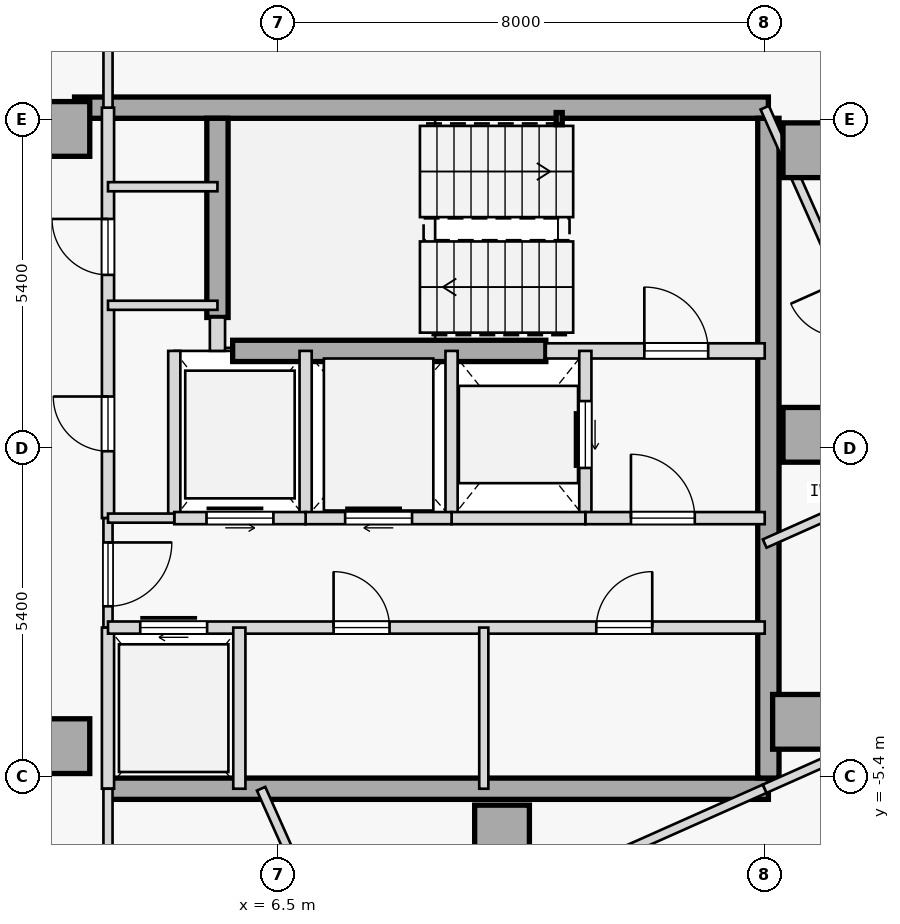
"""IFC4 building model, lengths in metres.
Left out: names, types, materials, properties, quantities, classifications, styles, units other than length and angle.
Written with IfcOpenShell. Run it as: python <this file> out.ifc"""

import sys

from ifc_helpers import new_model, si_unit, direction, frame, frame_2d, origin, origin_2d, place, context, subcontext, project, spatial, rectangle, hollow_rectangle, extrude, element, fill, save


model = new_model("IFC4")
c1 = context("Model", 3, precision=1e-05, world=origin(), true_north=direction((0.0, 1.0)))
c2 = subcontext(c1, "Body", "Model", "MODEL_VIEW")
j1 = project(units=[si_unit("LENGTHUNIT", "METRE"), si_unit("PLANEANGLEUNIT", "RADIAN")], contexts=[c1])
p1 = place(None, origin())
s1 = spatial("IfcSite", under=j1, at=p1, CompositionType="ELEMENT")
p2 = place(p1, origin())
s2 = spatial("IfcBuilding", under=s1, at=p2, CompositionType="ELEMENT")
p3 = place(p2, frame((0.0, 0.0, 258.85)))
s3 = spatial("IfcBuildingStorey", under=s2, at=p3, CompositionType="ELEMENT", Elevation=258.85)
for number, where, z_axis, x_axis in (
    (1, (15.25, 4.9, 0.0), (0.0, 0.0, 1.0), (1.0, 0.0, 0.0)),
    (2, (15.25, 0.22, 0.0), (0.0, 0.0, 1.0), (1.0, 0.0, 0.0)),
    (3, (15.08, -4.5, 0.0), (0.0, 0.0, 1.0), (1.0, 0.0, 0.0)),
    (4, (10.18, -6.32, 0.0), (0.0, 0.0, 1.0), (1.0, 0.0, 0.0)),
    (5, (2.95, -4.9, 0.0), (0.0, 0.0, 1.0), (1.0, 0.0, 0.0)),
    (6, (2.95, 5.25, 0.0), (0.0, 0.0, 1.0), (1.0, 0.0, 0.0)),
):
    element("IfcColumn", number, at=place(p3, frame(where, z_axis=z_axis, x_axis=x_axis)), inside=s3, PredefinedType="COLUMN", context=c2, shape_type="SweptSolid", body=[
        extrude(rectangle(XDim=0.9, YDim=0.9, at=origin_2d()), origin(), (0.0, 0.0, 1.0), 3.35),
    ])
p4 = place(p3, frame((3.15, 5.6, 0.0), z_axis=(0.0, 0.0, 1.0), x_axis=(1.0, 0.0, 0.0)))
e7 = element("IfcWall", 7, at=p4, inside=s3, PredefinedType="SHEAR", context=c2, shape_type="SweptSolid", body=[
    extrude(rectangle(XDim=11.41, YDim=0.35, at=frame_2d((5.705, 0.0))), origin(), (0.0, 0.0, 1.0), 3.125),
])
p5 = place(p3, frame((3.7, -5.6, 0.0), z_axis=(0.0, 0.0, 1.0), x_axis=(1.0, 0.0, 0.0)))
e8 = element("IfcWall", 8, at=p5, inside=s3, PredefinedType="SHEAR", context=c2, shape_type="SweptSolid", body=[
    extrude(rectangle(XDim=10.86, YDim=0.35, at=frame_2d((5.43, 0.0))), origin(), (0.0, 0.0, 1.0), 3.125),
])
p6 = place(p3, frame((14.56, -5.425, 0.0), z_axis=(0.0, 0.0, 1.0), x_axis=(0.0, 1.0, 0.0)))
e9 = element("IfcWall", 9, at=p6, inside=s3, PredefinedType="SHEAR", context=c2, shape_type="SweptSolid", body=[
    extrude(rectangle(XDim=10.85, YDim=0.35, at=frame_2d((5.425, 0.0))), origin(), (0.0, 0.0, 1.0), 3.125),
])
p7 = place(p3, frame((5.5, 2.15, 0.0), z_axis=(0.0, 0.0, 1.0), x_axis=(0.0, 1.0, 0.0)))
e10 = element("IfcWall", 10, at=p7, inside=s3, PredefinedType="SHEAR", context=c2, shape_type="SweptSolid", body=[
    extrude(rectangle(XDim=3.275, YDim=0.35, at=frame_2d((1.638, 0.0))), origin(), (0.0, 0.0, 1.0), 3.125),
])
p8 = place(p3, frame((5.75, 1.6, 0.0), z_axis=(0.0, 0.0, 1.0), x_axis=(1.0, 0.0, 0.0)))
e11 = element("IfcWall", 11, at=p8, inside=s3, PredefinedType="SHEAR", context=c2, shape_type="SweptSolid", body=[
    extrude(rectangle(XDim=5.15, YDim=0.35, at=frame_2d((2.575, 0.0))), origin(), (0.0, 0.0, 1.0), 3.125),
])
p9 = place(p3, frame((11.12, 5.42, 0.0), z_axis=(0.0, 0.0, 1.0), x_axis=(1.0, 0.0, 0.0)))
e12 = element("IfcColumn", 12, at=p9, inside=s3, PredefinedType="COLUMN", context=c2, shape_type="SweptSolid", body=[
    extrude(hollow_rectangle(XDim=0.1, YDim=0.2, WallThickness=0.008, at=origin_2d()), origin(), (0.0, 0.0, 1.0), 3.35),
])
p10 = place(p3, frame((10.9, 1.6, 0.0), z_axis=(0.0, 0.0, 1.0), x_axis=(1.0, 0.0, 0.0)))
e13 = element("IfcWall", 13, at=p10, inside=s3, PredefinedType="STANDARD", context=c2, shape_type="SweptSolid", body=[
    extrude(rectangle(XDim=3.6, YDim=0.25, at=frame_2d((1.8, 0.0))), origin(), (0.0, 0.0, 1.0), 3.125),
])
p11 = place(p10, frame((1.62, 0.0, 0.0)))
e14 = element("IfcOpeningElement", 14, at=p11, cuts=e13, PredefinedType="OPENING", context=c2, shape_type="SweptSolid", body=[
    extrude(rectangle(XDim=1.05, YDim=2.15, at=frame_2d((0.525, 1.075))), frame((0.0, 0.135, 0.0), z_axis=(0.0, -1.0, 0.0), x_axis=(1.0, 0.0, 0.0)), (0.0, 0.0, 1.0), 0.27),
])
p12 = place(p3, frame((5.5, 1.6, 0.0), z_axis=(0.0, 0.0, 1.0), x_axis=(0.0, 1.0, 0.0)))
e15 = element("IfcWall", 15, at=p12, inside=s3, PredefinedType="STANDARD", context=c2, shape_type="SweptSolid", body=[
    extrude(rectangle(XDim=0.55, YDim=0.25, at=frame_2d((0.275, 0.0))), origin(), (0.0, 0.0, 1.0), 3.125),
])
p13 = place(p3, frame((3.7, -1.15, 0.0), z_axis=(0.0, 0.0, 1.0), x_axis=(0.0, 1.0, 0.0)))
e16 = element("IfcWall", 16, at=p13, inside=s3, PredefinedType="STANDARD", context=c2, shape_type="SweptSolid", body=[
    extrude(rectangle(XDim=6.75, YDim=0.2, at=frame_2d((3.375, 0.0))), origin(), (0.0, 0.0, 1.0), 3.125),
])
p14 = place(p13, frame((1.1, 0.0, 0.0)))
e17 = element("IfcOpeningElement", 17, at=p14, cuts=e16, PredefinedType="OPENING", context=c2, shape_type="SweptSolid", body=[
    extrude(rectangle(XDim=0.9, YDim=2.15, at=frame_2d((0.45, 1.075))), frame((0.0, 0.11, 0.0), z_axis=(0.0, -1.0, 0.0), x_axis=(1.0, 0.0, 0.0)), (0.0, 0.0, 1.0), 0.22),
])
p15 = place(p13, frame((4.0, 0.0, 0.0)))
e18 = element("IfcOpeningElement", 18, at=p15, cuts=e16, PredefinedType="OPENING", context=c2, shape_type="SweptSolid", body=[
    extrude(rectangle(XDim=0.92, YDim=2.15, at=frame_2d((0.46, 1.075))), frame((0.0, 0.11, 0.0), z_axis=(0.0, -1.0, 0.0), x_axis=(1.0, 0.0, 0.0)), (0.0, 0.0, 1.0), 0.22),
])
p16 = place(p3, frame((3.7, -2.95, 0.0), z_axis=(0.0, 0.0, 1.0), x_axis=(0.0, 1.0, 0.0)))
e19 = element("IfcWall", 19, at=p16, inside=s3, PredefinedType="PARTITIONING", context=c2, shape_type="SweptSolid", body=[
    extrude(rectangle(XDim=1.8, YDim=0.15, at=frame_2d((0.9, 0.0))), origin(), (0.0, 0.0, 1.0), 3.125),
])
p17 = place(p16, frame((0.35, 0.0, 0.0)))
e20 = element("IfcOpeningElement", 20, at=p17, cuts=e19, PredefinedType="OPENING", context=c2, shape_type="SweptSolid", body=[
    extrude(rectangle(XDim=1.05, YDim=2.18, at=frame_2d((0.525, 1.09))), frame((0.0, 0.085, 0.0), z_axis=(0.0, -1.0, 0.0), x_axis=(1.0, 0.0, 0.0)), (0.0, 0.0, 1.0), 0.17),
])
p18 = place(p3, frame((3.7, -5.6, 0.0), z_axis=(0.0, 0.0, 1.0), x_axis=(0.0, 1.0, 0.0)))
e21 = element("IfcWall", 21, at=p18, inside=s3, PredefinedType="STANDARD", context=c2, shape_type="SweptSolid", body=[
    extrude(rectangle(XDim=2.65, YDim=0.2, at=frame_2d((1.325, 0.0))), origin(), (0.0, 0.0, 1.0), 3.125),
])
p19 = place(p3, frame((11.55, -1.15, 0.0), z_axis=(0.0, 0.0, 1.0), x_axis=(0.0, 1.0, 0.0)))
e22 = element("IfcWall", 22, at=p19, inside=s3, PredefinedType="STANDARD", context=c2, shape_type="SweptSolid", body=[
    extrude(rectangle(XDim=2.75, YDim=0.2, at=frame_2d((1.375, 0.0))), origin(), (0.0, 0.0, 1.0), 3.125),
])
p20 = place(p19, frame((0.825, 0.0, 0.0)))
e23 = element("IfcOpeningElement", 23, at=p20, cuts=e22, PredefinedType="OPENING", context=c2, shape_type="SweptSolid", body=[
    extrude(rectangle(XDim=1.1, YDim=2.15, at=frame_2d((0.55, 1.075))), frame((0.0, 0.11, 0.0), z_axis=(0.0, -1.0, 0.0), x_axis=(1.0, 0.0, 0.0)), (0.0, 0.0, 1.0), 0.22),
])
p21 = place(p3, frame((9.35, -1.15, 0.0), z_axis=(0.0, 0.0, 1.0), x_axis=(0.0, 1.0, 0.0)))
e24 = element("IfcWall", 24, at=p21, inside=s3, PredefinedType="STANDARD", context=c2, shape_type="SweptSolid", body=[
    extrude(rectangle(XDim=2.75, YDim=0.2, at=frame_2d((1.375, 0.0))), origin(), (0.0, 0.0, 1.0), 3.125),
])
p22 = place(p3, frame((11.55, -1.15, 0.0), z_axis=(0.0, 0.0, 1.0), x_axis=(1.0, 0.0, 0.0)))
e25 = element("IfcWall", 25, at=p22, inside=s3, PredefinedType="STANDARD", context=c2, shape_type="SweptSolid", body=[
    extrude(rectangle(XDim=2.95, YDim=0.2, at=frame_2d((1.475, 0.0))), origin(), (0.0, 0.0, 1.0), 3.125),
])
p23 = place(p22, frame((0.75, 0.0, 0.0)))
e26 = element("IfcOpeningElement", 26, at=p23, cuts=e25, PredefinedType="OPENING", context=c2, shape_type="SweptSolid", body=[
    extrude(rectangle(XDim=1.05, YDim=2.18, at=frame_2d((0.525, 1.09))), frame((0.0, 0.11, 0.0), z_axis=(0.0, -1.0, 0.0), x_axis=(1.0, 0.0, 0.0)), (0.0, 0.0, 1.0), 0.22),
])
p24 = place(p3, frame((9.35, -1.15, 0.0), z_axis=(0.0, 0.0, 1.0), x_axis=(1.0, 0.0, 0.0)))
e27 = element("IfcWall", 27, at=p24, inside=s3, PredefinedType="STANDARD", context=c2, shape_type="SweptSolid", body=[
    extrude(rectangle(XDim=2.2, YDim=0.2, at=frame_2d((1.1, 0.0))), origin(), (0.0, 0.0, 1.0), 3.125),
])
p25 = place(p3, frame((6.95, -1.15, 0.0), z_axis=(0.0, 0.0, 1.0), x_axis=(0.0, 1.0, 0.0)))
e28 = element("IfcWall", 28, at=p25, inside=s3, PredefinedType="STANDARD", context=c2, shape_type="SweptSolid", body=[
    extrude(rectangle(XDim=2.75, YDim=0.2, at=frame_2d((1.375, 0.0))), origin(), (0.0, 0.0, 1.0), 3.125),
])
p26 = place(p3, frame((6.95, -1.15, 0.0), z_axis=(0.0, 0.0, 1.0), x_axis=(1.0, 0.0, 0.0)))
e29 = element("IfcWall", 29, at=p26, inside=s3, PredefinedType="STANDARD", context=c2, shape_type="SweptSolid", body=[
    extrude(rectangle(XDim=2.4, YDim=0.2, at=frame_2d((1.2, 0.0))), origin(), (0.0, 0.0, 1.0), 3.125),
])
p27 = place(p26, frame((0.65, 0.0, 0.0)))
e30 = element("IfcOpeningElement", 30, at=p27, cuts=e29, PredefinedType="OPENING", context=c2, shape_type="SweptSolid", body=[
    extrude(rectangle(XDim=1.1, YDim=2.15, at=frame_2d((0.55, 1.075))), frame((0.0, 0.11, 0.0), z_axis=(0.0, -1.0, 0.0), x_axis=(1.0, 0.0, 0.0)), (0.0, 0.0, 1.0), 0.22),
])
p28 = place(p3, frame((4.79, -1.15, 0.0), z_axis=(0.0, 0.0, 1.0), x_axis=(0.0, 1.0, 0.0)))
e31 = element("IfcWall", 31, at=p28, inside=s3, PredefinedType="STANDARD", context=c2, shape_type="SweptSolid", body=[
    extrude(rectangle(XDim=2.75, YDim=0.2, at=frame_2d((1.375, 0.0))), origin(), (0.0, 0.0, 1.0), 3.125),
])
p29 = place(p3, frame((4.79, -1.15, 0.0), z_axis=(0.0, 0.0, 1.0), x_axis=(1.0, 0.0, 0.0)))
e32 = element("IfcWall", 32, at=p29, inside=s3, PredefinedType="STANDARD", context=c2, shape_type="SweptSolid", body=[
    extrude(rectangle(XDim=2.16, YDim=0.2, at=frame_2d((1.08, 0.0))), origin(), (0.0, 0.0, 1.0), 3.125),
])
p30 = place(p29, frame((0.53, 0.0, 0.0)))
e33 = element("IfcOpeningElement", 33, at=p30, cuts=e32, PredefinedType="OPENING", context=c2, shape_type="SweptSolid", body=[
    extrude(rectangle(XDim=1.1, YDim=2.15, at=frame_2d((0.55, 1.075))), frame((0.0, 0.11, 0.0), z_axis=(0.0, -1.0, 0.0), x_axis=(1.0, 0.0, 0.0)), (0.0, 0.0, 1.0), 0.22),
])
p31 = place(p3, frame((3.7, -1.15, 0.0), z_axis=(0.0, 0.0, 1.0), x_axis=(1.0, 0.0, 0.0)))
e34 = element("IfcWall", 34, at=p31, inside=s3, PredefinedType="PARTITIONING", context=c2, shape_type="SweptSolid", body=[
    extrude(rectangle(XDim=1.09, YDim=0.15, at=frame_2d((0.545, 0.0))), origin(), (0.0, 0.0, 1.0), 3.125),
])
p32 = place(p3, frame((3.7, -2.95, 0.0), z_axis=(0.0, 0.0, 1.0), x_axis=(1.0, 0.0, 0.0)))
e35 = element("IfcWall", 35, at=p32, inside=s3, PredefinedType="STANDARD", context=c2, shape_type="SweptSolid", body=[
    extrude(rectangle(XDim=10.8, YDim=0.2, at=frame_2d((5.4, 0.0))), origin(), (0.0, 0.0, 1.0), 3.125),
])
p33 = place(p32, frame((0.53, 0.0, 0.0)))
e36 = element("IfcOpeningElement", 36, at=p33, cuts=e35, PredefinedType="OPENING", context=c2, shape_type="SweptSolid", body=[
    extrude(rectangle(XDim=1.1, YDim=2.15, at=frame_2d((0.55, 1.075))), frame((0.0, 0.11, 0.0), z_axis=(0.0, -1.0, 0.0), x_axis=(1.0, 0.0, 0.0)), (0.0, 0.0, 1.0), 0.22),
])
p34 = place(p32, frame((3.71, 0.0, 0.0)))
e37 = element("IfcOpeningElement", 37, at=p34, cuts=e35, PredefinedType="OPENING", context=c2, shape_type="SweptSolid", body=[
    extrude(rectangle(XDim=0.92, YDim=2.15, at=frame_2d((0.46, 1.075))), frame((0.0, 0.11, 0.0), z_axis=(0.0, -1.0, 0.0), x_axis=(1.0, 0.0, 0.0)), (0.0, 0.0, 1.0), 0.22),
])
p35 = place(p32, frame((8.03, 0.0, 0.0)))
e38 = element("IfcOpeningElement", 38, at=p35, cuts=e35, PredefinedType="OPENING", context=c2, shape_type="SweptSolid", body=[
    extrude(rectangle(XDim=0.92, YDim=2.15, at=frame_2d((0.46, 1.075))), frame((0.0, 0.11, 0.0), z_axis=(0.0, -1.0, 0.0), x_axis=(1.0, 0.0, 0.0)), (0.0, 0.0, 1.0), 0.22),
])
p36 = place(p3, frame((5.86, -5.6, 0.0), z_axis=(0.0, 0.0, 1.0), x_axis=(0.0, 1.0, 0.0)))
e39 = element("IfcWall", 39, at=p36, inside=s3, PredefinedType="STANDARD", context=c2, shape_type="SweptSolid", body=[
    extrude(rectangle(XDim=2.65, YDim=0.2, at=frame_2d((1.325, 0.0))), origin(), (0.0, 0.0, 1.0), 3.125),
])
p37 = place(p3, frame((9.88, -5.6, 0.0), z_axis=(0.0, 0.0, 1.0), x_axis=(0.0, 1.0, 0.0)))
e40 = element("IfcWall", 40, at=p37, inside=s3, PredefinedType="PARTITIONING", context=c2, shape_type="SweptSolid", body=[
    extrude(rectangle(XDim=2.65, YDim=0.15, at=frame_2d((1.325, 0.0))), origin(), (0.0, 0.0, 1.0), 3.125),
])
for number, where, z_axis, x_axis in (
    (41, (3.7, 4.3, 0.0), (0.0, 0.0, 1.0), (1.0, 0.0, 0.0)),
    (42, (3.7, 2.35, 0.0), (0.0, 0.0, 1.0), (1.0, 0.0, 0.0)),
):
    element("IfcWall", number, at=place(p3, frame(where, z_axis=z_axis, x_axis=x_axis)), inside=s3, PredefinedType="PARTITIONING", context=c2, shape_type="SweptSolid", body=[
        extrude(rectangle(XDim=1.8, YDim=0.15, at=frame_2d((0.9, 0.0))), origin(), (0.0, 0.0, 1.0), 3.125),
    ])
p38 = place(p3, frame((3.7, -10.409, 0.0), z_axis=(0.0, 0.0, 1.0), x_axis=(5.0769153e-05, 0.999999998711, 0.0)))
e43 = element("IfcWall", 43, at=p38, inside=s3, PredefinedType="PARTITIONING", context=c2, shape_type="SweptSolid", body=[
    extrude(rectangle(XDim=4.809, YDim=0.15, at=frame_2d((2.404, 0.0))), origin(), (0.0, 0.0, 1.0), 3.125),
])
p39 = place(p38, frame((1.944, 0.0, 0.0)))
e44 = element("IfcOpeningElement", 44, at=p39, cuts=e43, PredefinedType="OPENING", context=c2, shape_type="SweptSolid", body=[
    extrude(rectangle(XDim=0.92, YDim=2.15, at=frame_2d((0.46, 1.075))), frame((0.0, 0.085, 0.0), z_axis=(0.0, -1.0, 0.0), x_axis=(1.0, 0.0, 0.0)), (0.0, 0.0, 1.0), 0.17),
])
p40 = place(p3, frame((7.588, -8.677, 0.0), z_axis=(0.0, 0.0, 1.0), x_axis=(0.913555880467, 0.406713232221, 0.0)))
e45 = element("IfcWall", 45, at=p40, inside=s3, PredefinedType="PARTITIONING", context=c2, shape_type="SweptSolid", body=[
    extrude(rectangle(XDim=7.566, YDim=0.15, at=frame_2d((3.783, 0.0))), origin(), (0.0, 0.0, 1.0), 3.125),
])
p41 = place(p40, frame((1.205, 0.0, 0.0)))
e46 = element("IfcOpeningElement", 46, at=p41, cuts=e45, PredefinedType="OPENING", context=c2, shape_type="SweptSolid", body=[
    extrude(rectangle(XDim=0.92, YDim=2.15, at=frame_2d((0.46, 1.075))), frame((0.0, 0.085, 0.0), z_axis=(0.0, -1.0, 0.0), x_axis=(1.0, 0.0, 0.0)), (0.0, 0.0, 1.0), 0.17),
])
p42 = place(p3, frame((14.5, -5.6, 0.0), z_axis=(0.0, 0.0, 1.0), x_axis=(0.913550607208, 0.406725076766, 0.0)))
e47 = element("IfcWall", 47, at=p42, inside=s3, PredefinedType="PARTITIONING", context=c2, shape_type="SweptSolid", body=[
    extrude(rectangle(XDim=4.556, YDim=0.15, at=frame_2d((2.278, 0.0))), origin(), (0.0, 0.0, 1.0), 3.125),
])
p43 = place(p42, frame((2.501, 0.0, 0.0)))
e48 = element("IfcOpeningElement", 48, at=p43, cuts=e47, PredefinedType="OPENING", context=c2, shape_type="SweptSolid", body=[
    extrude(rectangle(XDim=0.92, YDim=2.15, at=frame_2d((0.46, 1.075))), frame((0.0, 0.085, 0.0), z_axis=(0.0, -1.0, 0.0), x_axis=(1.0, 0.0, 0.0)), (0.0, 0.0, 1.0), 0.17),
])
p44 = place(p3, frame((3.7, 5.601, 0.0), z_axis=(0.0, 0.0, 1.0), x_axis=(-6.0264561e-05, 0.999999998184, 0.0)))
e49 = element("IfcWall", 49, at=p44, inside=s3, PredefinedType="PARTITIONING", context=c2, shape_type="SweptSolid", body=[
    extrude(rectangle(XDim=8.102, YDim=0.15, at=frame_2d((4.051, 0.0))), origin(), (0.0, 0.0, 1.0), 2.675),
])
p45 = place(p44, frame((3.591, 0.0, 0.0)))
e50 = element("IfcOpeningElement", 50, at=p45, cuts=e49, PredefinedType="OPENING", context=c2, shape_type="SweptSolid", body=[
    extrude(rectangle(XDim=0.92, YDim=2.15, at=frame_2d((0.46, 1.075))), frame((0.0, 0.085, 0.0), z_axis=(0.0, -1.0, 0.0), x_axis=(1.0, 0.0, 0.0)), (0.0, 0.0, 1.0), 0.17),
])
p46 = place(p3, frame((7.588, -8.677, 0.0), z_axis=(0.0, 0.0, 1.0), x_axis=(-0.406763688861, 0.913533415603, 0.0)))
e51 = element("IfcWall", 51, at=p46, inside=s3, PredefinedType="PARTITIONING", context=c2, shape_type="SweptSolid", body=[
    extrude(rectangle(XDim=3.369, YDim=0.15, at=frame_2d((1.685, 0.0))), origin(), (0.0, 0.0, 1.0), 3.125),
])
p47 = place(p3, frame((14.5, -1.568, 0.0), z_axis=(0.0, 0.0, 1.0), x_axis=(0.91354204122, 0.4067443164, 0.0)))
e52 = element("IfcWall", 52, at=p47, inside=s3, PredefinedType="PARTITIONING", context=c2, shape_type="SweptSolid", body=[
    extrude(rectangle(XDim=2.916, YDim=0.15, at=frame_2d((1.458, 0.0))), origin(), (0.0, 0.0, 1.0), 3.125),
])
p48 = place(p3, frame((15.616, 3.094, 0.0), z_axis=(0.0, 0.0, 1.0), x_axis=(-0.406782551453, 0.913525016534, 0.0)))
e53 = element("IfcWall", 53, at=p48, inside=s3, PredefinedType="PARTITIONING", context=c2, shape_type="SweptSolid", body=[
    extrude(rectangle(XDim=2.743, YDim=0.15, at=frame_2d((1.372, 0.0))), origin(), (0.0, 0.0, 1.0), 3.125),
])
p49 = place(p11, origin())
e54 = element("IfcDoor", 54, at=p49, inside=s3, OperationType="SINGLE_SWING_LEFT", PredefinedType="DOOR", context=c2, shape_type="SweptSolid", body=[
    extrude(rectangle(XDim=1.05, YDim=2.15, at=frame_2d((0.525, 1.075))), frame((0.0, 0.025, 0.0), z_axis=(0.0, -1.0, 0.0), x_axis=(1.0, 0.0, 0.0)), (0.0, 0.0, 1.0), 0.05),
])
fill(e14, e54)
p50 = place(p23, origin())
e55 = element("IfcDoor", 55, at=p50, inside=s3, OperationType="SINGLE_SWING_LEFT", PredefinedType="DOOR", context=c2, shape_type="SweptSolid", body=[
    extrude(rectangle(XDim=1.05, YDim=2.18, at=frame_2d((0.525, 1.09))), frame((0.0, 0.025, 0.0), z_axis=(0.0, -1.0, 0.0), x_axis=(1.0, 0.0, 0.0)), (0.0, 0.0, 1.0), 0.05),
])
fill(e26, e55)
p51 = place(p17, frame((1.05, 0.0, 0.0), z_axis=(0.0, 0.0, 1.0), x_axis=(-1.0, 0.0, 0.0)))
e56 = element("IfcDoor", 56, at=p51, inside=s3, OperationType="SINGLE_SWING_RIGHT", PredefinedType="DOOR", context=c2, shape_type="SweptSolid", body=[
    extrude(rectangle(XDim=1.05, YDim=2.18, at=frame_2d((0.525, 1.09))), frame((0.0, 0.025, 0.0), z_axis=(0.0, -1.0, 0.0), x_axis=(1.0, 0.0, 0.0)), (0.0, 0.0, 1.0), 0.05),
])
fill(e20, e56)
p52 = place(p20, origin())
e57 = element("IfcDoor", 57, at=p52, inside=s3, OperationType="SLIDING_TO_RIGHT", PredefinedType="DOOR", context=c2, shape_type="SweptSolid", body=[
    extrude(rectangle(XDim=1.1, YDim=2.15, at=frame_2d((0.55, 1.075))), frame((0.0, 0.025, 0.0), z_axis=(0.0, -1.0, 0.0), x_axis=(1.0, 0.0, 0.0)), (0.0, 0.0, 1.0), 0.05),
])
fill(e23, e57)
p53 = place(p27, origin())
e58 = element("IfcDoor", 58, at=p53, inside=s3, OperationType="SLIDING_TO_RIGHT", PredefinedType="DOOR", context=c2, shape_type="SweptSolid", body=[
    extrude(rectangle(XDim=1.1, YDim=2.15, at=frame_2d((0.55, 1.075))), frame((0.0, 0.025, 0.0), z_axis=(0.0, -1.0, 0.0), x_axis=(1.0, 0.0, 0.0)), (0.0, 0.0, 1.0), 0.05),
])
fill(e30, e58)
p54 = place(p30, origin())
e59 = element("IfcDoor", 59, at=p54, inside=s3, OperationType="SLIDING_TO_LEFT", PredefinedType="DOOR", context=c2, shape_type="SweptSolid", body=[
    extrude(rectangle(XDim=1.1, YDim=2.15, at=frame_2d((0.55, 1.075))), frame((0.0, 0.025, 0.0), z_axis=(0.0, -1.0, 0.0), x_axis=(1.0, 0.0, 0.0)), (0.0, 0.0, 1.0), 0.05),
])
fill(e33, e59)
p55 = place(p33, origin())
e60 = element("IfcDoor", 60, at=p55, inside=s3, OperationType="SLIDING_TO_RIGHT", PredefinedType="DOOR", context=c2, shape_type="SweptSolid", body=[
    extrude(rectangle(XDim=1.1, YDim=2.15, at=frame_2d((0.55, 1.075))), frame((0.0, 0.025, 0.0), z_axis=(0.0, -1.0, 0.0), x_axis=(1.0, 0.0, 0.0)), (0.0, 0.0, 1.0), 0.05),
])
fill(e36, e60)
p56 = place(p34, origin())
e61 = element("IfcDoor", 61, at=p56, inside=s3, OperationType="SINGLE_SWING_LEFT", PredefinedType="DOOR", context=c2, shape_type="SweptSolid", body=[
    extrude(rectangle(XDim=0.92, YDim=2.15, at=frame_2d((0.46, 1.075))), frame((0.0, 0.025, 0.0), z_axis=(0.0, -1.0, 0.0), x_axis=(1.0, 0.0, 0.0)), (0.0, 0.0, 1.0), 0.05),
])
fill(e37, e61)
p57 = place(p35, origin())
e62 = element("IfcDoor", 62, at=p57, inside=s3, OperationType="SINGLE_SWING_RIGHT", PredefinedType="DOOR", context=c2, shape_type="SweptSolid", body=[
    extrude(rectangle(XDim=0.92, YDim=2.15, at=frame_2d((0.46, 1.075))), frame((0.0, 0.025, 0.0), z_axis=(0.0, -1.0, 0.0), x_axis=(1.0, 0.0, 0.0)), (0.0, 0.0, 1.0), 0.05),
])
fill(e38, e62)
p58 = place(p14, origin())
e63 = element("IfcDoor", 63, at=p58, inside=s3, OperationType="SINGLE_SWING_RIGHT", PredefinedType="DOOR", context=c2, shape_type="SweptSolid", body=[
    extrude(rectangle(XDim=0.9, YDim=2.15, at=frame_2d((0.45, 1.075))), frame((0.0, 0.025, 0.0), z_axis=(0.0, -1.0, 0.0), x_axis=(1.0, 0.0, 0.0)), (0.0, 0.0, 1.0), 0.05),
])
fill(e17, e63)
p59 = place(p15, origin())
e64 = element("IfcDoor", 64, at=p59, inside=s3, OperationType="SINGLE_SWING_RIGHT", PredefinedType="DOOR", context=c2, shape_type="SweptSolid", body=[
    extrude(rectangle(XDim=0.92, YDim=2.15, at=frame_2d((0.46, 1.075))), frame((0.0, 0.025, 0.0), z_axis=(0.0, -1.0, 0.0), x_axis=(1.0, 0.0, 0.0)), (0.0, 0.0, 1.0), 0.05),
])
fill(e18, e64)
save(model, sys.argv[1])
